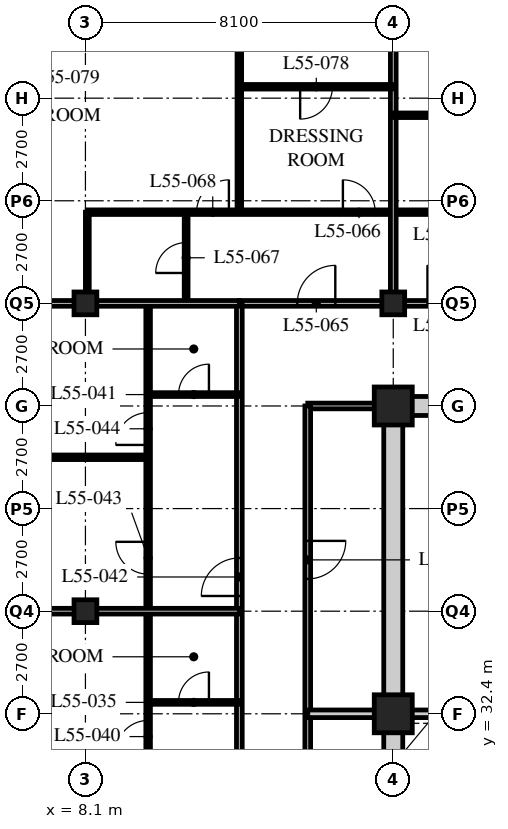
"""IFC4 building model, lengths in metres.
Left out: names, types, materials, properties, quantities, classifications, styles, units other than length and angle.
Written with IfcOpenShell. Run it as: python <this file> out.ifc"""

import sys

from ifc_helpers import new_model, si_unit, direction, frame, frame_2d, origin, origin_2d, place, context, subcontext, project, spatial, rectangle, hollow_rectangle, extrude, element, fill, save


model = new_model("IFC4")
c1 = context("Model", 3, precision=1e-05, world=origin(), true_north=direction((0.0, 1.0)))
c2 = subcontext(c1, "Body", "Model", "MODEL_VIEW")
j1 = project(units=[si_unit("LENGTHUNIT", "METRE"), si_unit("PLANEANGLEUNIT", "RADIAN")], contexts=[c1])
p1 = place(None, origin())
s1 = spatial("IfcSite", under=j1, at=p1, CompositionType="ELEMENT")
p2 = place(p1, origin())
s2 = spatial("IfcBuilding", under=s1, at=p2, CompositionType="ELEMENT")
p3 = place(p2, frame((0.0, 0.0, 213.6)))
s3 = spatial("IfcBuildingStorey", under=s2, at=p3, CompositionType="ELEMENT", Elevation=213.6)
for number, where, z_axis, x_axis in (
    (1, (8.1, 35.1, 0.0), (0.0, 0.0, 1.0), (1.0, 0.0, 0.0)),
    (2, (8.1, 43.2, 0.0), (0.0, 0.0, 1.0), (1.0, 0.0, 0.0)),
):
    element("IfcColumn", number, at=place(p3, frame(where, z_axis=z_axis, x_axis=x_axis)), inside=s3, PredefinedType="COLUMN", context=c2, shape_type="SweptSolid", body=[
        extrude(hollow_rectangle(XDim=0.6, YDim=0.6, WallThickness=0.05, at=origin_2d()), origin(), (0.0, 0.0, 1.0), 3.6),
    ])
for number, where, z_axis, x_axis in (
    (3, (16.2, 32.4, 0.0), (0.0, 0.0, 1.0), (1.0, 0.0, 0.0)),
    (4, (16.2, 40.5, 0.0), (0.0, 0.0, 1.0), (1.0, 0.0, 0.0)),
):
    element("IfcColumn", number, at=place(p3, frame(where, z_axis=z_axis, x_axis=x_axis)), inside=s3, PredefinedType="COLUMN", context=c2, shape_type="SweptSolid", body=[
        extrude(hollow_rectangle(XDim=1.0, YDim=1.0, WallThickness=0.1, at=origin_2d()), origin(), (0.0, 0.0, 1.0), 3.6),
    ])
p4 = place(p3, frame((16.2, 43.2, 0.0), z_axis=(0.0, 0.0, 1.0), x_axis=(1.0, 0.0, 0.0)))
e5 = element("IfcColumn", 5, at=p4, inside=s3, PredefinedType="COLUMN", context=c2, shape_type="SweptSolid", body=[
    extrude(hollow_rectangle(XDim=0.6, YDim=0.6, WallThickness=0.05, at=origin_2d()), origin(), (0.0, 0.0, 1.0), 3.6),
])
p5 = place(p3, frame((12.15, 43.2, 0.0), z_axis=(0.0, 0.0, 1.0), x_axis=(1.0, 0.0, 0.0)))
e6 = element("IfcWall", 6, at=p5, inside=s3, PredefinedType="PARTITIONING", context=c2, shape_type="SweptSolid", body=[
    extrude(rectangle(XDim=36.45, YDim=0.15, at=frame_2d((18.225, 0.0))), origin(), (0.0, 0.0, 1.0), 2.778),
])
p6 = place(p5, frame((4.95, 0.0, 0.0)))
e7 = element("IfcOpeningElement", 7, at=p6, cuts=e6, PredefinedType="OPENING", context=c2, shape_type="SweptSolid", body=[
    extrude(rectangle(XDim=1.0, YDim=2.1, at=frame_2d((0.5, 1.05))), frame((0.0, 0.085, 0.0), z_axis=(0.0, -1.0, 0.0), x_axis=(1.0, 0.0, 0.0)), (0.0, 0.0, 1.0), 0.17),
])
p7 = place(p5, frame((25.0, 0.0, 0.0)))
e8 = element("IfcOpeningElement", 8, at=p7, cuts=e6, PredefinedType="OPENING", context=c2, shape_type="SweptSolid", body=[
    extrude(rectangle(XDim=1.0, YDim=2.1, at=frame_2d((0.5, 1.05))), frame((0.0, 0.085, 0.0), z_axis=(0.0, -1.0, 0.0), x_axis=(1.0, 0.0, 0.0)), (0.0, 0.0, 1.0), 0.17),
])
p8 = place(p5, frame((30.7, 0.0, 0.0)))
e9 = element("IfcOpeningElement", 9, at=p8, cuts=e6, PredefinedType="OPENING", context=c2, shape_type="SweptSolid", body=[
    extrude(rectangle(XDim=1.0, YDim=2.1, at=frame_2d((0.5, 1.05))), frame((0.0, 0.085, 0.0), z_axis=(0.0, -1.0, 0.0), x_axis=(1.0, 0.0, 0.0)), (0.0, 0.0, 1.0), 0.17),
])
p9 = place(p5, frame((33.925, 0.0, 0.0)))
e10 = element("IfcOpeningElement", 10, at=p9, cuts=e6, PredefinedType="OPENING", context=c2, shape_type="SweptSolid", body=[
    extrude(rectangle(XDim=1.0, YDim=2.1, at=frame_2d((0.5, 1.05))), frame((0.0, 0.085, 0.0), z_axis=(0.0, -1.0, 0.0), x_axis=(1.0, 0.0, 0.0)), (0.0, 0.0, 1.0), 0.17),
])
p10 = place(p5, frame((1.525, 0.0, 0.0)))
e11 = element("IfcOpeningElement", 11, at=p10, cuts=e6, PredefinedType="OPENING", context=c2, shape_type="SweptSolid", body=[
    extrude(rectangle(XDim=1.0, YDim=2.1, at=frame_2d((0.5, 1.05))), frame((0.0, 0.085, 0.0), z_axis=(0.0, -1.0, 0.0), x_axis=(1.0, 0.0, 0.0)), (0.0, 0.0, 1.0), 0.17),
])
p11 = place(p3, frame((12.15, 18.9, 0.0), z_axis=(0.0, 0.0, 1.0), x_axis=(0.0, 1.0, 0.0)))
e12 = element("IfcWall", 12, at=p11, inside=s3, PredefinedType="PARTITIONING", context=c2, shape_type="SweptSolid", body=[
    extrude(rectangle(XDim=24.3, YDim=0.15, at=frame_2d((12.15, 0.0))), origin(), (0.0, 0.0, 1.0), 3.39),
])
p12 = place(p11, frame((0.4, 0.0, 0.0)))
e13 = element("IfcOpeningElement", 13, at=p12, cuts=e12, PredefinedType="OPENING", context=c2, shape_type="SweptSolid", body=[
    extrude(rectangle(XDim=1.0, YDim=2.1, at=frame_2d((0.5, 1.05))), frame((0.0, 0.085, 0.0), z_axis=(0.0, -1.0, 0.0), x_axis=(1.0, 0.0, 0.0)), (0.0, 0.0, 1.0), 0.17),
])
p13 = place(p11, frame((16.6, 0.0, 0.0)))
e14 = element("IfcOpeningElement", 14, at=p13, cuts=e12, PredefinedType="OPENING", context=c2, shape_type="SweptSolid", body=[
    extrude(rectangle(XDim=1.0, YDim=2.1, at=frame_2d((0.5, 1.05))), frame((0.0, 0.085, 0.0), z_axis=(0.0, -1.0, 0.0), x_axis=(1.0, 0.0, 0.0)), (0.0, 0.0, 1.0), 0.17),
])
p14 = place(p3, frame((16.0, 40.5, 0.0), z_axis=(0.0, 0.0, 1.0), x_axis=(-1.0, 0.0, 0.0)))
e15 = element("IfcWall", 15, at=p14, inside=s3, PredefinedType="PARTITIONING", context=c2, shape_type="SweptSolid", body=[
    extrude(rectangle(XDim=2.05, YDim=0.15, at=frame_2d((1.025, 0.0))), origin(), (0.0, 0.0, 1.0), 3.39),
])
p15 = place(p3, frame((13.95, 40.5, 0.0), z_axis=(0.0, 0.0, 1.0), x_axis=(0.0, -1.0, 0.0)))
e16 = element("IfcWall", 16, at=p15, inside=s3, PredefinedType="PARTITIONING", context=c2, shape_type="SweptSolid", body=[
    extrude(rectangle(XDim=19.8, YDim=0.15, at=frame_2d((9.9, 0.0))), origin(), (0.0, 0.0, 1.0), 3.39),
])
p16 = place(p15, frame((11.65, 0.0, 0.0)))
e17 = element("IfcOpeningElement", 17, at=p16, cuts=e16, PredefinedType="OPENING", context=c2, shape_type="SweptSolid", body=[
    extrude(rectangle(XDim=1.0, YDim=2.1, at=frame_2d((0.5, 1.05))), frame((0.0, 0.085, 0.0), z_axis=(0.0, -1.0, 0.0), x_axis=(1.0, 0.0, 0.0)), (0.0, 0.0, 1.0), 0.17),
])
p17 = place(p15, frame((3.55, 0.0, 0.0)))
e18 = element("IfcOpeningElement", 18, at=p17, cuts=e16, PredefinedType="OPENING", context=c2, shape_type="SweptSolid", body=[
    extrude(rectangle(XDim=1.0, YDim=2.1, at=frame_2d((0.5, 1.05))), frame((0.0, 0.085, 0.0), z_axis=(0.0, -1.0, 0.0), x_axis=(1.0, 0.0, 0.0)), (0.0, 0.0, 1.0), 0.17),
])
p18 = place(p3, frame((13.95, 32.4, 0.0), z_axis=(0.0, 0.0, 1.0), x_axis=(1.0, 0.0, 0.0)))
e19 = element("IfcWall", 19, at=p18, inside=s3, PredefinedType="SOLIDWALL", context=c2, shape_type="SweptSolid", body=[
    extrude(rectangle(XDim=2.25, YDim=0.2, at=frame_2d((1.125, 0.0))), origin(), (0.0, 0.0, 1.0), 3.39),
])
p19 = place(p3, frame((9.75, 18.9, 0.0), z_axis=(0.0, 0.0, 1.0), x_axis=(0.0, 1.0, 0.0)))
e20 = element("IfcWall", 20, at=p19, inside=s3, PredefinedType="PARTITIONING", context=c2, shape_type="SweptSolid", body=[
    extrude(rectangle(XDim=24.3, YDim=0.12, at=frame_2d((12.15, 0.0))), origin(), (0.0, 0.0, 1.0), 3.39),
])
p20 = place(p19, frame((0.975, 0.0, 0.0)))
e21 = element("IfcOpeningElement", 21, at=p20, cuts=e20, PredefinedType="OPENING", context=c2, shape_type="SweptSolid", body=[
    extrude(rectangle(XDim=0.85, YDim=2.1, at=frame_2d((0.425, 1.05))), frame((0.0, 0.07, 0.0), z_axis=(0.0, -1.0, 0.0), x_axis=(1.0, 0.0, 0.0)), (0.0, 0.0, 1.0), 0.14),
])
p21 = place(p19, frame((8.425, 0.0, 0.0)))
e22 = element("IfcOpeningElement", 22, at=p21, cuts=e20, PredefinedType="OPENING", context=c2, shape_type="SweptSolid", body=[
    extrude(rectangle(XDim=0.85, YDim=2.1, at=frame_2d((0.425, 1.05))), frame((0.0, 0.07, 0.0), z_axis=(0.0, -1.0, 0.0), x_axis=(1.0, 0.0, 0.0)), (0.0, 0.0, 1.0), 0.14),
])
p22 = place(p19, frame((12.475, 0.0, 0.0)))
e23 = element("IfcOpeningElement", 23, at=p22, cuts=e20, PredefinedType="OPENING", context=c2, shape_type="SweptSolid", body=[
    extrude(rectangle(XDim=0.85, YDim=2.1, at=frame_2d((0.425, 1.05))), frame((0.0, 0.07, 0.0), z_axis=(0.0, -1.0, 0.0), x_axis=(1.0, 0.0, 0.0)), (0.0, 0.0, 1.0), 0.14),
])
p23 = place(p19, frame((17.175, 0.0, 0.0)))
e24 = element("IfcOpeningElement", 24, at=p23, cuts=e20, PredefinedType="OPENING", context=c2, shape_type="SweptSolid", body=[
    extrude(rectangle(XDim=0.85, YDim=2.1, at=frame_2d((0.425, 1.05))), frame((0.0, 0.07, 0.0), z_axis=(0.0, -1.0, 0.0), x_axis=(1.0, 0.0, 0.0)), (0.0, 0.0, 1.0), 0.14),
])
p24 = place(p19, frame((20.575, 0.0, 0.0)))
e25 = element("IfcOpeningElement", 25, at=p24, cuts=e20, PredefinedType="OPENING", context=c2, shape_type="SweptSolid", body=[
    extrude(rectangle(XDim=0.85, YDim=2.1, at=frame_2d((0.425, 1.05))), frame((0.0, 0.07, 0.0), z_axis=(0.0, -1.0, 0.0), x_axis=(1.0, 0.0, 0.0)), (0.0, 0.0, 1.0), 0.14),
])
p25 = place(p3, frame((12.15, 32.7, 0.0), z_axis=(0.0, 0.0, 1.0), x_axis=(-1.0, 0.0, 0.0)))
e26 = element("IfcWall", 26, at=p25, inside=s3, PredefinedType="PARTITIONING", context=c2, shape_type="SweptSolid", body=[
    extrude(rectangle(XDim=2.4, YDim=0.1, at=frame_2d((1.2, 0.0))), origin(), (0.0, 0.0, 1.0), 3.39),
])
p26 = place(p25, frame((0.8, 0.0, 0.0)))
e27 = element("IfcOpeningElement", 27, at=p26, cuts=e26, PredefinedType="OPENING", context=c2, shape_type="SweptSolid", body=[
    extrude(rectangle(XDim=0.8, YDim=2.1, at=frame_2d((0.4, 1.05))), frame((0.0, 0.06, 0.0), z_axis=(0.0, -1.0, 0.0), x_axis=(1.0, 0.0, 0.0)), (0.0, 0.0, 1.0), 0.12),
])
p27 = place(p3, frame((12.15, 35.1, 0.0), z_axis=(0.0, 0.0, 1.0), x_axis=(-1.0, 0.0, 0.0)))
e28 = element("IfcWall", 28, at=p27, inside=s3, PredefinedType="PARTITIONING", context=c2, shape_type="SweptSolid", body=[
    extrude(rectangle(XDim=11.85, YDim=0.15, at=frame_2d((5.925, 0.0))), origin(), (0.0, 0.0, 1.0), 2.778),
])
p28 = place(p3, frame((12.15, 40.8, 0.0), z_axis=(0.0, 0.0, 1.0), x_axis=(-1.0, 0.0, 0.0)))
e29 = element("IfcWall", 29, at=p28, inside=s3, PredefinedType="PARTITIONING", context=c2, shape_type="SweptSolid", body=[
    extrude(rectangle(XDim=2.4, YDim=0.1, at=frame_2d((1.2, 0.0))), origin(), (0.0, 0.0, 1.0), 3.39),
])
p29 = place(p28, frame((0.8, 0.0, 0.0)))
e30 = element("IfcOpeningElement", 30, at=p29, cuts=e29, PredefinedType="OPENING", context=c2, shape_type="SweptSolid", body=[
    extrude(rectangle(XDim=0.8, YDim=2.1, at=frame_2d((0.4, 1.05))), frame((0.0, 0.06, 0.0), z_axis=(0.0, -1.0, 0.0), x_axis=(1.0, 0.0, 0.0)), (0.0, 0.0, 1.0), 0.12),
])
p30 = place(p3, frame((9.75, 39.15, 0.0), z_axis=(0.0, 0.0, 1.0), x_axis=(-1.0, 0.0, 0.0)))
e31 = element("IfcWall", 31, at=p30, inside=s3, PredefinedType="PARTITIONING", context=c2, shape_type="SweptSolid", body=[
    extrude(rectangle(XDim=9.45, YDim=0.12, at=frame_2d((4.725, 0.0))), origin(), (0.0, 0.0, 1.0), 3.39),
])
p31 = place(p3, frame((10.75, 43.2, 0.0), z_axis=(0.0, 0.0, 1.0), x_axis=(0.0, 1.0, 0.0)))
e32 = element("IfcWall", 32, at=p31, inside=s3, PredefinedType="PARTITIONING", context=c2, shape_type="SweptSolid", body=[
    extrude(rectangle(XDim=2.4, YDim=0.1, at=frame_2d((1.2, 0.0))), origin(), (0.0, 0.0, 1.0), 3.39),
])
p32 = place(p31, frame((0.8, 0.0, 0.0)))
e33 = element("IfcOpeningElement", 33, at=p32, cuts=e32, PredefinedType="OPENING", context=c2, shape_type="SweptSolid", body=[
    extrude(rectangle(XDim=0.8, YDim=2.1, at=frame_2d((0.4, 1.05))), frame((0.0, 0.06, 0.0), z_axis=(0.0, -1.0, 0.0), x_axis=(1.0, 0.0, 0.0)), (0.0, 0.0, 1.0), 0.12),
])
p33 = place(p3, frame((8.15, 43.2, 0.0), z_axis=(0.0, 0.0, 1.0), x_axis=(0.0, 1.0, 0.0)))
e34 = element("IfcWall", 34, at=p33, inside=s3, PredefinedType="PARTITIONING", context=c2, shape_type="SweptSolid", body=[
    extrude(rectangle(XDim=2.4, YDim=0.1, at=frame_2d((1.2, 0.0))), origin(), (0.0, 0.0, 1.0), 2.778),
])
p34 = place(p3, frame((8.15, 45.6, 0.0), z_axis=(0.0, 0.0, 1.0), x_axis=(1.0, 0.0, 0.0)))
e35 = element("IfcWall", 35, at=p34, inside=s3, PredefinedType="PARTITIONING", context=c2, shape_type="SweptSolid", body=[
    extrude(rectangle(XDim=28.3, YDim=0.12, at=frame_2d((14.15, 0.0))), origin(), (0.0, 0.0, 1.0), 3.39),
])
p35 = place(p34, frame((9.025, 0.0, 0.0)))
e36 = element("IfcOpeningElement", 36, at=p35, cuts=e35, PredefinedType="OPENING", context=c2, shape_type="SweptSolid", body=[
    extrude(rectangle(XDim=0.85, YDim=2.1, at=frame_2d((0.425, 1.05))), frame((0.0, 0.07, 0.0), z_axis=(0.0, -1.0, 0.0), x_axis=(1.0, 0.0, 0.0)), (0.0, 0.0, 1.0), 0.14),
])
p36 = place(p34, frame((16.475, 0.0, 0.0)))
e37 = element("IfcOpeningElement", 37, at=p36, cuts=e35, PredefinedType="OPENING", context=c2, shape_type="SweptSolid", body=[
    extrude(rectangle(XDim=0.85, YDim=2.1, at=frame_2d((0.425, 1.05))), frame((0.0, 0.07, 0.0), z_axis=(0.0, -1.0, 0.0), x_axis=(1.0, 0.0, 0.0)), (0.0, 0.0, 1.0), 0.14),
])
p37 = place(p34, frame((20.525, 0.0, 0.0)))
e38 = element("IfcOpeningElement", 38, at=p37, cuts=e35, PredefinedType="OPENING", context=c2, shape_type="SweptSolid", body=[
    extrude(rectangle(XDim=0.85, YDim=2.1, at=frame_2d((0.425, 1.05))), frame((0.0, 0.07, 0.0), z_axis=(0.0, -1.0, 0.0), x_axis=(1.0, 0.0, 0.0)), (0.0, 0.0, 1.0), 0.14),
])
p38 = place(p34, frame((24.575, 0.0, 0.0)))
e39 = element("IfcOpeningElement", 39, at=p38, cuts=e35, PredefinedType="OPENING", context=c2, shape_type="SweptSolid", body=[
    extrude(rectangle(XDim=0.85, YDim=2.1, at=frame_2d((0.425, 1.05))), frame((0.0, 0.07, 0.0), z_axis=(0.0, -1.0, 0.0), x_axis=(1.0, 0.0, 0.0)), (0.0, 0.0, 1.0), 0.14),
])
p39 = place(p34, frame((6.725, 0.0, 0.0)))
e40 = element("IfcOpeningElement", 40, at=p39, cuts=e35, PredefinedType="OPENING", context=c2, shape_type="SweptSolid", body=[
    extrude(rectangle(XDim=0.85, YDim=2.1, at=frame_2d((0.425, 1.05))), frame((0.0, 0.07, 0.0), z_axis=(0.0, -1.0, 0.0), x_axis=(1.0, 0.0, 0.0)), (0.0, 0.0, 1.0), 0.14),
])
p40 = place(p34, frame((2.875, 0.0, 0.0)))
e41 = element("IfcOpeningElement", 41, at=p40, cuts=e35, PredefinedType="OPENING", context=c2, shape_type="SweptSolid", body=[
    extrude(rectangle(XDim=0.85, YDim=2.1, at=frame_2d((0.425, 1.05))), frame((0.0, 0.07, 0.0), z_axis=(0.0, -1.0, 0.0), x_axis=(1.0, 0.0, 0.0)), (0.0, 0.0, 1.0), 0.14),
])
p41 = place(p3, frame((12.15, 45.6, 0.0), z_axis=(0.0, 0.0, 1.0), x_axis=(0.0, 1.0, 0.0)))
e42 = element("IfcWall", 42, at=p41, inside=s3, PredefinedType="PARTITIONING", context=c2, shape_type="SweptSolid", body=[
    extrude(rectangle(XDim=13.5, YDim=0.12, at=frame_2d((6.75, 0.0))), origin(), (0.0, 0.0, 1.0), 3.39),
])
p42 = place(p3, frame((0.3, 43.2, 0.0), z_axis=(0.0, 0.0, 1.0), x_axis=(1.0, 0.0, 0.0)))
e43 = element("IfcWall", 43, at=p42, inside=s3, PredefinedType="PARTITIONING", context=c2, shape_type="SweptSolid", body=[
    extrude(rectangle(XDim=11.85, YDim=0.15, at=frame_2d((5.925, 0.0))), origin(), (0.0, 0.0, 1.0), 2.778),
])
p43 = place(p3, frame((16.2, 43.2, 0.0), z_axis=(0.0, 0.0, 1.0), x_axis=(0.0, 1.0, 0.0)))
e44 = element("IfcWall", 44, at=p43, inside=s3, PredefinedType="PARTITIONING", context=c2, shape_type="SweptSolid", body=[
    extrude(rectangle(XDim=15.9, YDim=0.15, at=frame_2d((7.95, 0.0))), origin(), (0.0, 0.0, 1.0), 2.778),
])
p44 = place(p3, frame((16.2, 48.15, 0.0), z_axis=(0.0, 0.0, 1.0), x_axis=(1.0, 0.0, 0.0)))
e45 = element("IfcWall", 45, at=p44, inside=s3, PredefinedType="PARTITIONING", context=c2, shape_type="SweptSolid", body=[
    extrude(rectangle(XDim=8.1, YDim=0.12, at=frame_2d((4.05, 0.0))), origin(), (0.0, 0.0, 1.0), 3.39),
])
p45 = place(p44, frame((3.625, 0.0, 0.0)))
e46 = element("IfcOpeningElement", 46, at=p45, cuts=e45, PredefinedType="OPENING", context=c2, shape_type="SweptSolid", body=[
    extrude(rectangle(XDim=0.85, YDim=2.1, at=frame_2d((0.425, 1.05))), frame((0.0, 0.07, 0.0), z_axis=(0.0, -1.0, 0.0), x_axis=(1.0, 0.0, 0.0)), (0.0, 0.0, 1.0), 0.14),
])
p46 = place(p3, frame((12.15, 48.9, 0.0), z_axis=(0.0, 0.0, 1.0), x_axis=(1.0, 0.0, 0.0)))
e47 = element("IfcWall", 47, at=p46, inside=s3, PredefinedType="PARTITIONING", context=c2, shape_type="SweptSolid", body=[
    extrude(rectangle(XDim=4.05, YDim=0.12, at=frame_2d((2.025, 0.0))), origin(), (0.0, 0.0, 1.0), 3.39),
])
p47 = place(p46, frame((1.6, 0.0, 0.0)))
e48 = element("IfcOpeningElement", 48, at=p47, cuts=e47, PredefinedType="OPENING", context=c2, shape_type="SweptSolid", body=[
    extrude(rectangle(XDim=0.85, YDim=2.1, at=frame_2d((0.425, 1.05))), frame((0.0, 0.07, 0.0), z_axis=(0.0, -1.0, 0.0), x_axis=(1.0, 0.0, 0.0)), (0.0, 0.0, 1.0), 0.14),
])
p48 = place(p3, frame((15.95, 40.5, 0.0), z_axis=(0.0, 0.0, 1.0), x_axis=(1.0, 0.0, 0.0)))
e49 = element("IfcWall", 49, at=p48, inside=s3, PredefinedType="SOLIDWALL", context=c2, shape_type="SweptSolid", body=[
    extrude(rectangle(XDim=24.8, YDim=0.5, at=frame_2d((12.4, 0.0))), origin(), (0.0, 0.0, 1.0), 2.74),
])
p49 = place(p48, frame((11.5, 0.0, 0.0)))
e50 = element("IfcOpeningElement", 50, at=p49, cuts=e49, PredefinedType="OPENING", context=c2, shape_type="SweptSolid", body=[
    extrude(rectangle(XDim=1.8, YDim=2.4, at=frame_2d((0.9, 1.2))), frame((0.0, 0.26, 0.0), z_axis=(0.0, -1.0, 0.0), x_axis=(1.0, 0.0, 0.0)), (0.0, 0.0, 1.0), 0.52),
])
p50 = place(p3, frame((16.2, 24.55, 0.0), z_axis=(0.0, 0.0, 1.0), x_axis=(0.0, 1.0, 0.0)))
e51 = element("IfcWall", 51, at=p50, inside=s3, PredefinedType="SOLIDWALL", context=c2, shape_type="SweptSolid", body=[
    extrude(rectangle(XDim=15.7, YDim=0.5, at=frame_2d((7.85, 0.0))), origin(), (0.0, 0.0, 1.0), 2.778),
])
p51 = place(p3, frame((16.45, 32.4, 0.0), z_axis=(0.0, 0.0, 1.0), x_axis=(1.0, 0.0, 0.0)))
e52 = element("IfcWall", 52, at=p51, inside=s3, PredefinedType="SOLIDWALL", context=c2, shape_type="SweptSolid", body=[
    extrude(rectangle(XDim=7.95, YDim=0.2, at=frame_2d((3.975, 0.0))), origin(), (0.0, 0.0, 1.0), 2.778),
])
p52 = place(p17, origin())
e53 = element("IfcDoor", 53, at=p52, inside=s3, OperationType="SINGLE_SWING_LEFT", PredefinedType="DOOR", context=c2, shape_type="SweptSolid", body=[
    extrude(rectangle(XDim=1.0, YDim=2.1, at=frame_2d((0.5, 1.05))), frame((0.0, 0.025, 0.0), z_axis=(0.0, -1.0, 0.0), x_axis=(1.0, 0.0, 0.0)), (0.0, 0.0, 1.0), 0.05),
])
fill(e18, e53)
p53 = place(p6, origin())
e54 = element("IfcDoor", 54, at=p53, inside=s3, OperationType="SINGLE_SWING_LEFT", PredefinedType="DOOR", context=c2, shape_type="SweptSolid", body=[
    extrude(rectangle(XDim=1.0, YDim=2.1, at=frame_2d((0.5, 1.05))), frame((0.0, 0.025, 0.0), z_axis=(0.0, -1.0, 0.0), x_axis=(1.0, 0.0, 0.0)), (0.0, 0.0, 1.0), 0.05),
])
fill(e7, e54)
p54 = place(p26, origin())
e55 = element("IfcDoor", 55, at=p54, inside=s3, OperationType="SINGLE_SWING_RIGHT", PredefinedType="DOOR", context=c2, shape_type="SweptSolid", body=[
    extrude(rectangle(XDim=0.8, YDim=2.1, at=frame_2d((0.4, 1.05))), frame((0.0, 0.025, 0.0), z_axis=(0.0, -1.0, 0.0), x_axis=(1.0, 0.0, 0.0)), (0.0, 0.0, 1.0), 0.05),
])
fill(e27, e55)
p55 = place(p22, origin())
e56 = element("IfcDoor", 56, at=p55, inside=s3, OperationType="SINGLE_SWING_LEFT", PredefinedType="DOOR", context=c2, shape_type="SweptSolid", body=[
    extrude(rectangle(XDim=0.85, YDim=2.1, at=frame_2d((0.425, 1.05))), frame((0.0, 0.025, 0.0), z_axis=(0.0, -1.0, 0.0), x_axis=(1.0, 0.0, 0.0)), (0.0, 0.0, 1.0), 0.05),
])
fill(e23, e56)
p56 = place(p29, origin())
e57 = element("IfcDoor", 57, at=p56, inside=s3, OperationType="SINGLE_SWING_RIGHT", PredefinedType="DOOR", context=c2, shape_type="SweptSolid", body=[
    extrude(rectangle(XDim=0.8, YDim=2.1, at=frame_2d((0.4, 1.05))), frame((0.0, 0.025, 0.0), z_axis=(0.0, -1.0, 0.0), x_axis=(1.0, 0.0, 0.0)), (0.0, 0.0, 1.0), 0.05),
])
fill(e30, e57)
p57 = place(p13, origin())
e58 = element("IfcDoor", 58, at=p57, inside=s3, OperationType="SINGLE_SWING_LEFT", PredefinedType="DOOR", context=c2, shape_type="SweptSolid", body=[
    extrude(rectangle(XDim=1.0, YDim=2.1, at=frame_2d((0.5, 1.05))), frame((0.0, 0.025, 0.0), z_axis=(0.0, -1.0, 0.0), x_axis=(1.0, 0.0, 0.0)), (0.0, 0.0, 1.0), 0.05),
])
fill(e14, e58)
p58 = place(p23, origin())
e59 = element("IfcDoor", 59, at=p58, inside=s3, OperationType="SINGLE_SWING_RIGHT", PredefinedType="DOOR", context=c2, shape_type="SweptSolid", body=[
    extrude(rectangle(XDim=0.85, YDim=2.1, at=frame_2d((0.425, 1.05))), frame((0.0, 0.025, 0.0), z_axis=(0.0, -1.0, 0.0), x_axis=(1.0, 0.0, 0.0)), (0.0, 0.0, 1.0), 0.05),
])
fill(e24, e59)
p59 = place(p24, origin())
e60 = element("IfcDoor", 60, at=p59, inside=s3, OperationType="SINGLE_SWING_LEFT", PredefinedType="DOOR", context=c2, shape_type="SweptSolid", body=[
    extrude(rectangle(XDim=0.85, YDim=2.1, at=frame_2d((0.425, 1.05))), frame((0.0, 0.025, 0.0), z_axis=(0.0, -1.0, 0.0), x_axis=(1.0, 0.0, 0.0)), (0.0, 0.0, 1.0), 0.05),
])
fill(e25, e60)
p60 = place(p10, origin())
e61 = element("IfcDoor", 61, at=p60, inside=s3, OperationType="SINGLE_SWING_RIGHT", PredefinedType="DOOR", context=c2, shape_type="SweptSolid", body=[
    extrude(rectangle(XDim=1.0, YDim=2.1, at=frame_2d((0.5, 1.05))), frame((0.0, 0.025, 0.0), z_axis=(0.0, -1.0, 0.0), x_axis=(1.0, 0.0, 0.0)), (0.0, 0.0, 1.0), 0.05),
])
fill(e11, e61)
p61 = place(p39, origin())
e62 = element("IfcDoor", 62, at=p61, inside=s3, OperationType="SINGLE_SWING_LEFT", PredefinedType="DOOR", context=c2, shape_type="SweptSolid", body=[
    extrude(rectangle(XDim=0.85, YDim=2.1, at=frame_2d((0.425, 1.05))), frame((0.0, 0.025, 0.0), z_axis=(0.0, -1.0, 0.0), x_axis=(1.0, 0.0, 0.0)), (0.0, 0.0, 1.0), 0.05),
])
fill(e40, e62)
p62 = place(p32, origin())
e63 = element("IfcDoor", 63, at=p62, inside=s3, OperationType="SINGLE_SWING_LEFT", PredefinedType="DOOR", context=c2, shape_type="SweptSolid", body=[
    extrude(rectangle(XDim=0.8, YDim=2.1, at=frame_2d((0.4, 1.05))), frame((0.0, 0.025, 0.0), z_axis=(0.0, -1.0, 0.0), x_axis=(1.0, 0.0, 0.0)), (0.0, 0.0, 1.0), 0.05),
])
fill(e33, e63)
p63 = place(p40, origin())
e64 = element("IfcDoor", 64, at=p63, inside=s3, OperationType="SINGLE_SWING_RIGHT", PredefinedType="DOOR", context=c2, shape_type="SweptSolid", body=[
    extrude(rectangle(XDim=0.85, YDim=2.1, at=frame_2d((0.425, 1.05))), frame((0.0, 0.025, 0.0), z_axis=(0.0, -1.0, 0.0), x_axis=(1.0, 0.0, 0.0)), (0.0, 0.0, 1.0), 0.05),
])
fill(e41, e64)
p64 = place(p47, origin())
e65 = element("IfcDoor", 65, at=p64, inside=s3, OperationType="SINGLE_SWING_RIGHT", PredefinedType="DOOR", context=c2, shape_type="SweptSolid", body=[
    extrude(rectangle(XDim=0.85, YDim=2.1, at=frame_2d((0.425, 1.05))), frame((0.0, 0.025, 0.0), z_axis=(0.0, -1.0, 0.0), x_axis=(1.0, 0.0, 0.0)), (0.0, 0.0, 1.0), 0.05),
])
fill(e48, e65)
save(model, sys.argv[1])
